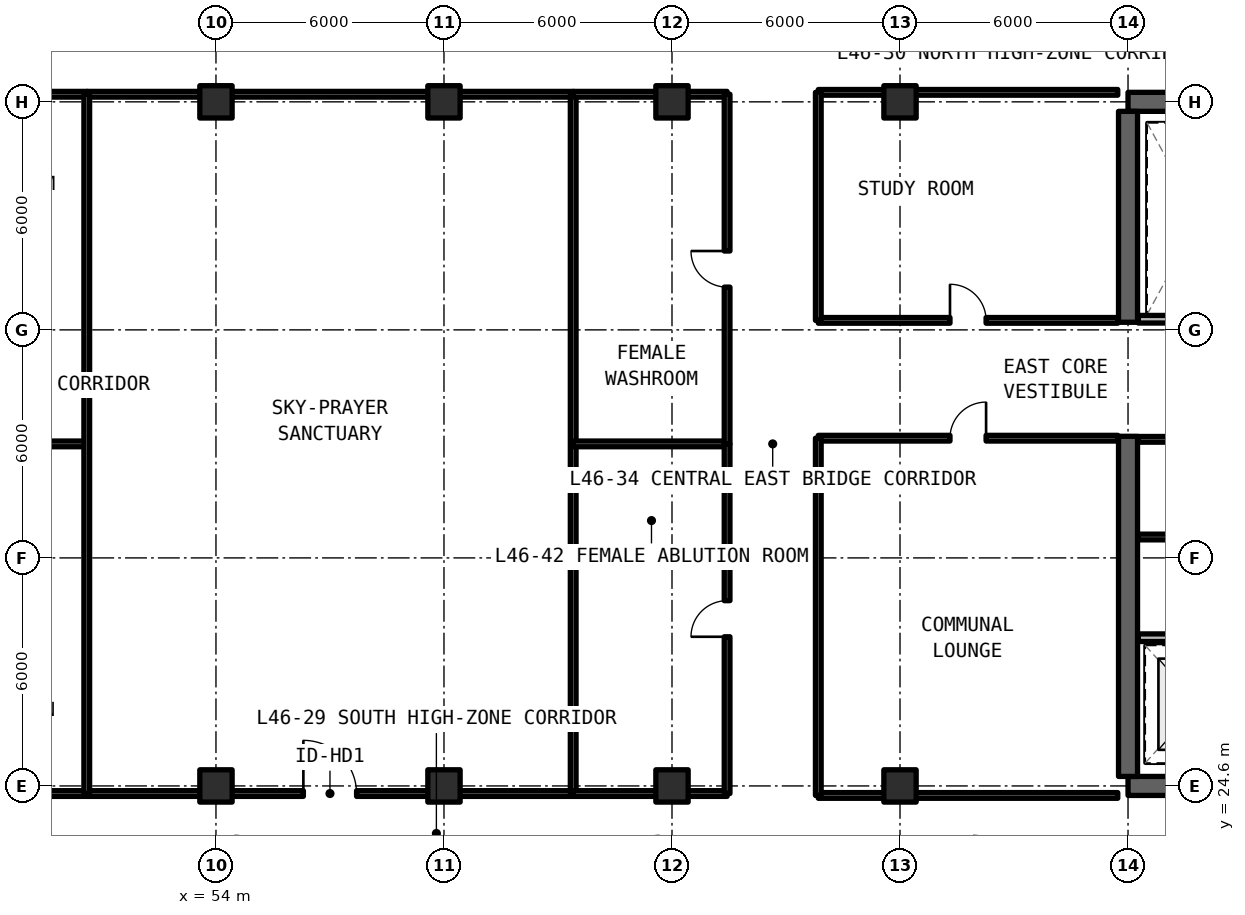
"""IFC4 building model, lengths in metres.
Left out: names, types, materials, properties, quantities, classifications, styles, units other than length and angle.
Written with IfcOpenShell. Run it as: python <this file> out.ifc"""

import sys

from ifc_helpers import new_model, si_unit, direction, frame, frame_2d, origin, origin_2d, place, context, subcontext, project, spatial, rectangle, extrude, element, fill, save


model = new_model("IFC4")
c1 = context("Model", 3, precision=1e-05, world=origin(), true_north=direction((0.0, 1.0)))
c2 = subcontext(c1, "Body", "Model", "MODEL_VIEW")
j1 = project(units=[si_unit("LENGTHUNIT", "METRE"), si_unit("PLANEANGLEUNIT", "RADIAN")], contexts=[c1])
p1 = place(None, origin())
s1 = spatial("IfcSite", under=j1, at=p1, CompositionType="ELEMENT")
p2 = place(p1, origin())
s2 = spatial("IfcBuilding", under=s1, at=p2, CompositionType="ELEMENT")
p3 = place(p2, frame((0.0, 0.0, 165.66)))
s3 = spatial("IfcBuildingStorey", under=s2, at=p3, CompositionType="ELEMENT", Elevation=165.66)
for number, where, z_axis, x_axis in (
    (1, (78.0, 24.6, 0.0), (0.0, 0.0, 1.0), (1.0, 0.0, 0.0)),
    (2, (90.0, 42.6, 0.0), (0.0, 0.0, 1.0), (-1.0, 0.0, 0.0)),
):
    element("IfcWall", number, at=place(p3, frame(where, z_axis=z_axis, x_axis=x_axis)), inside=s3, PredefinedType="SHEAR", context=c2, shape_type="SweptSolid", body=[
        extrude(rectangle(XDim=12.0, YDim=0.5, at=frame_2d((6.0, 0.0))), origin(), (0.0, 0.0, 1.0), 3.63),
    ])
p4 = place(p3, frame((78.0, 24.85, 0.0), z_axis=(0.0, 0.0, 1.0), x_axis=(0.0, 1.0, 0.0)))
e3 = element("IfcWall", 3, at=p4, inside=s3, PredefinedType="SHEAR", context=c2, shape_type="SweptSolid", body=[
    extrude(rectangle(XDim=8.95, YDim=0.5, at=frame_2d((4.475, 0.0))), origin(), (0.0, 0.0, 1.0), 3.63),
])
p5 = place(p3, frame((78.0, 36.8, 0.0), z_axis=(0.0, 0.0, 1.0), x_axis=(0.0, 1.0, 0.0)))
e4 = element("IfcWall", 4, at=p5, inside=s3, PredefinedType="SHEAR", context=c2, shape_type="SweptSolid", body=[
    extrude(rectangle(XDim=5.55, YDim=0.5, at=frame_2d((2.775, 0.0))), origin(), (0.0, 0.0, 1.0), 3.63),
])
for number, where, z_axis, x_axis in (
    (5, (54.0, 24.6, 0.0), (0.0, 0.0, 1.0), (1.0, 0.0, 0.0)),
    (6, (54.0, 42.6, 0.0), (0.0, 0.0, 1.0), (1.0, 0.0, 0.0)),
    (7, (60.0, 24.6, 0.0), (0.0, 0.0, 1.0), (1.0, 0.0, 0.0)),
    (8, (60.0, 42.6, 0.0), (0.0, 0.0, 1.0), (1.0, 0.0, 0.0)),
    (9, (66.0, 24.6, 0.0), (0.0, 0.0, 1.0), (1.0, 0.0, 0.0)),
    (10, (66.0, 42.6, 0.0), (0.0, 0.0, 1.0), (1.0, 0.0, 0.0)),
    (11, (72.0, 24.6, 0.0), (0.0, 0.0, 1.0), (1.0, 0.0, 0.0)),
    (12, (72.0, 42.6, 0.0), (0.0, 0.0, 1.0), (1.0, 0.0, 0.0)),
):
    element("IfcColumn", number, at=place(p3, frame(where, z_axis=z_axis, x_axis=x_axis)), inside=s3, PredefinedType="COLUMN", context=c2, shape_type="SweptSolid", body=[
        extrude(rectangle(XDim=0.85, YDim=0.85, at=origin_2d()), origin(), (0.0, 0.0, 1.0), 3.63),
    ])
p6 = place(p3, frame((78.27, 28.5, 0.0), z_axis=(0.0, 0.0, 1.0), x_axis=(1.0, 0.0, 0.0)))
e13 = element("IfcWall", 13, at=p6, inside=s3, PredefinedType="SOLIDWALL", context=c2, shape_type="SweptSolid", body=[
    extrude(rectangle(XDim=7.51, YDim=0.2, at=frame_2d((3.755, 0.0))), origin(), (0.0, 0.0, 1.0), 2.63),
])
p7 = place(p6, frame((3.53, 0.0, 0.0)))
e14 = element("IfcOpeningElement", 14, at=p7, cuts=e13, PredefinedType="OPENING", context=c2, shape_type="SweptSolid", body=[
    extrude(rectangle(XDim=1.0, YDim=2.15, at=frame_2d((0.5, 1.075))), frame((0.0, 0.11, 0.0), z_axis=(0.0, -1.0, 0.0), x_axis=(1.0, 0.0, 0.0)), (0.0, 0.0, 1.0), 0.22),
])
for number, where, z_axis, x_axis in (
    (15, (78.27, 31.15, 0.0), (0.0, 0.0, 1.0), (1.0, 0.0, 0.0)),
    (16, (78.27, 33.72, 0.0), (0.0, 0.0, 1.0), (1.0, 0.0, 0.0)),
):
    element("IfcWall", number, at=place(p3, frame(where, z_axis=z_axis, x_axis=x_axis)), inside=s3, PredefinedType="SOLIDWALL", context=c2, shape_type="SweptSolid", body=[
        extrude(rectangle(XDim=3.05, YDim=0.15, at=frame_2d((1.525, 0.0))), origin(), (0.0, 0.0, 1.0), 2.63),
    ])
p8 = place(p3, frame((78.27, 36.88, 0.0), z_axis=(0.0, 0.0, 1.0), x_axis=(1.0, 0.0, 0.0)))
e17 = element("IfcWall", 17, at=p8, inside=s3, PredefinedType="SOLIDWALL", context=c2, shape_type="SweptSolid", body=[
    extrude(rectangle(XDim=3.05, YDim=0.2, at=frame_2d((1.525, 0.0))), origin(), (0.0, 0.0, 1.0), 2.63),
])
p9 = place(p3, frame((69.85, 24.35, 0.0), z_axis=(0.0, 0.0, 1.0), x_axis=(1.0, 0.0, 0.0)))
e18 = element("IfcWall", 18, at=p9, inside=s3, PredefinedType="SOLIDWALL", context=c2, shape_type="SweptSolid", body=[
    extrude(rectangle(XDim=7.88, YDim=0.15, at=frame_2d((3.94, 0.0))), origin(), (0.0, 0.0, 1.0), 2.63),
])
p10 = place(p3, frame((69.85, 33.75, 0.0), z_axis=(0.0, 0.0, 1.0), x_axis=(1.0, 0.0, 0.0)))
e19 = element("IfcWall", 19, at=p10, inside=s3, PredefinedType="SOLIDWALL", context=c2, shape_type="SweptSolid", body=[
    extrude(rectangle(XDim=7.88, YDim=0.15, at=frame_2d((3.94, 0.0))), origin(), (0.0, 0.0, 1.0), 2.63),
])
p11 = place(p10, frame((3.465, 0.0, 0.0)))
e20 = element("IfcOpeningElement", 20, at=p11, cuts=e19, PredefinedType="OPENING", context=c2, shape_type="SweptSolid", body=[
    extrude(rectangle(XDim=0.95, YDim=2.15, at=frame_2d((0.475, 1.075))), frame((0.0, 0.085, 0.0), z_axis=(0.0, -1.0, 0.0), x_axis=(1.0, 0.0, 0.0)), (0.0, 0.0, 1.0), 0.17),
])
p12 = place(p3, frame((69.85, 24.35, 0.0), z_axis=(0.0, 0.0, 1.0), x_axis=(0.0, 1.0, 0.0)))
e21 = element("IfcWall", 21, at=p12, inside=s3, PredefinedType="SOLIDWALL", context=c2, shape_type="SweptSolid", body=[
    extrude(rectangle(XDim=9.4, YDim=0.15, at=frame_2d((4.7, 0.0))), origin(), (0.0, 0.0, 1.0), 2.63),
])
p13 = place(p3, frame((69.85, 36.85, 0.0), z_axis=(0.0, 0.0, 1.0), x_axis=(1.0, 0.0, 0.0)))
e22 = element("IfcWall", 22, at=p13, inside=s3, PredefinedType="SOLIDWALL", context=c2, shape_type="SweptSolid", body=[
    extrude(rectangle(XDim=7.88, YDim=0.15, at=frame_2d((3.94, 0.0))), origin(), (0.0, 0.0, 1.0), 2.63),
])
p14 = place(p13, frame((3.465, 0.0, 0.0)))
e23 = element("IfcOpeningElement", 23, at=p14, cuts=e22, PredefinedType="OPENING", context=c2, shape_type="SweptSolid", body=[
    extrude(rectangle(XDim=0.95, YDim=2.15, at=frame_2d((0.475, 1.075))), frame((0.0, 0.085, 0.0), z_axis=(0.0, -1.0, 0.0), x_axis=(1.0, 0.0, 0.0)), (0.0, 0.0, 1.0), 0.17),
])
p15 = place(p3, frame((69.85, 42.85, 0.0), z_axis=(0.0, 0.0, 1.0), x_axis=(1.0, 0.0, 0.0)))
e24 = element("IfcWall", 24, at=p15, inside=s3, PredefinedType="SOLIDWALL", context=c2, shape_type="SweptSolid", body=[
    extrude(rectangle(XDim=7.88, YDim=0.15, at=frame_2d((3.94, 0.0))), origin(), (0.0, 0.0, 1.0), 2.63),
])
p16 = place(p3, frame((69.85, 36.85, 0.0), z_axis=(0.0, 0.0, 1.0), x_axis=(0.0, 1.0, 0.0)))
e25 = element("IfcWall", 25, at=p16, inside=s3, PredefinedType="SOLIDWALL", context=c2, shape_type="SweptSolid", body=[
    extrude(rectangle(XDim=6.0, YDim=0.15, at=frame_2d((3.0, 0.0))), origin(), (0.0, 0.0, 1.0), 2.63),
])
for number, where, z_axis, x_axis in (
    (26, (46.55, 24.4, 0.0), (0.0, 0.0, 1.0), (1.0, 0.0, 0.0)),
    (27, (46.55, 33.6, 0.0), (0.0, 0.0, 1.0), (1.0, 0.0, 0.0)),
    (28, (46.55, 42.8, 0.0), (0.0, 0.0, 1.0), (1.0, 0.0, 0.0)),
):
    element("IfcWall", number, at=place(p3, frame(where, z_axis=z_axis, x_axis=x_axis)), inside=s3, PredefinedType="SOLIDWALL", context=c2, shape_type="SweptSolid", body=[
        extrude(rectangle(XDim=4.05, YDim=0.15, at=frame_2d((2.025, 0.0))), origin(), (0.0, 0.0, 1.0), 2.63),
    ])
p17 = place(p3, frame((50.6, 24.4, 0.0), z_axis=(0.0, 0.0, 1.0), x_axis=(1.0, 0.0, 0.0)))
e29 = element("IfcWall", 29, at=p17, inside=s3, PredefinedType="SOLIDWALL", context=c2, shape_type="SweptSolid", body=[
    extrude(rectangle(XDim=12.8, YDim=0.15, at=frame_2d((6.4, 0.0))), origin(), (0.0, 0.0, 1.0), 2.63),
])
p18 = place(p17, frame((5.7, 0.0, 0.0)))
e30 = element("IfcOpeningElement", 30, at=p18, cuts=e29, PredefinedType="OPENING", context=c2, shape_type="SweptSolid", body=[
    extrude(rectangle(XDim=1.4, YDim=2.15, at=frame_2d((0.7, 1.075))), frame((0.0, 0.085, 0.0), z_axis=(0.0, -1.0, 0.0), x_axis=(1.0, 0.0, 0.0)), (0.0, 0.0, 1.0), 0.17),
])
p19 = place(p3, frame((50.6, 42.8, 0.0), z_axis=(0.0, 0.0, 1.0), x_axis=(1.0, 0.0, 0.0)))
e31 = element("IfcWall", 31, at=p19, inside=s3, PredefinedType="SOLIDWALL", context=c2, shape_type="SweptSolid", body=[
    extrude(rectangle(XDim=12.8, YDim=0.15, at=frame_2d((6.4, 0.0))), origin(), (0.0, 0.0, 1.0), 2.63),
])
for number, where, z_axis, x_axis in (
    (32, (50.6, 24.4, 0.0), (0.0, 0.0, 1.0), (0.0, 1.0, 0.0)),
    (33, (63.4, 24.4, 0.0), (0.0, 0.0, 1.0), (0.0, 1.0, 0.0)),
):
    element("IfcWall", number, at=place(p3, frame(where, z_axis=z_axis, x_axis=x_axis)), inside=s3, PredefinedType="SOLIDWALL", context=c2, shape_type="SweptSolid", body=[
        extrude(rectangle(XDim=18.4, YDim=0.15, at=frame_2d((9.2, 0.0))), origin(), (0.0, 0.0, 1.0), 2.63),
    ])
for number, where, z_axis, x_axis in (
    (34, (63.4, 24.4, 0.0), (0.0, 0.0, 1.0), (1.0, 0.0, 0.0)),
    (35, (63.4, 33.6, 0.0), (0.0, 0.0, 1.0), (1.0, 0.0, 0.0)),
):
    element("IfcWall", number, at=place(p3, frame(where, z_axis=z_axis, x_axis=x_axis)), inside=s3, PredefinedType="SOLIDWALL", context=c2, shape_type="SweptSolid", body=[
        extrude(rectangle(XDim=4.05, YDim=0.15, at=frame_2d((2.025, 0.0))), origin(), (0.0, 0.0, 1.0), 2.63),
    ])
p20 = place(p3, frame((67.45, 24.4, 0.0), z_axis=(0.0, 0.0, 1.0), x_axis=(0.0, 1.0, 0.0)))
e36 = element("IfcWall", 36, at=p20, inside=s3, PredefinedType="SOLIDWALL", context=c2, shape_type="SweptSolid", body=[
    extrude(rectangle(XDim=9.2, YDim=0.15, at=frame_2d((4.6, 0.0))), origin(), (0.0, 0.0, 1.0), 2.63),
])
p21 = place(p20, frame((4.125, 0.0, 0.0)))
e37 = element("IfcOpeningElement", 37, at=p21, cuts=e36, PredefinedType="OPENING", context=c2, shape_type="SweptSolid", body=[
    extrude(rectangle(XDim=0.95, YDim=2.15, at=frame_2d((0.475, 1.075))), frame((0.0, 0.085, 0.0), z_axis=(0.0, -1.0, 0.0), x_axis=(1.0, 0.0, 0.0)), (0.0, 0.0, 1.0), 0.17),
])
p22 = place(p3, frame((63.4, 42.8, 0.0), z_axis=(0.0, 0.0, 1.0), x_axis=(1.0, 0.0, 0.0)))
e38 = element("IfcWall", 38, at=p22, inside=s3, PredefinedType="SOLIDWALL", context=c2, shape_type="SweptSolid", body=[
    extrude(rectangle(XDim=4.05, YDim=0.15, at=frame_2d((2.025, 0.0))), origin(), (0.0, 0.0, 1.0), 2.63),
])
p23 = place(p3, frame((67.45, 33.6, 0.0), z_axis=(0.0, 0.0, 1.0), x_axis=(0.0, 1.0, 0.0)))
e39 = element("IfcWall", 39, at=p23, inside=s3, PredefinedType="SOLIDWALL", context=c2, shape_type="SweptSolid", body=[
    extrude(rectangle(XDim=9.2, YDim=0.15, at=frame_2d((4.6, 0.0))), origin(), (0.0, 0.0, 1.0), 2.63),
])
p24 = place(p23, frame((4.125, 0.0, 0.0)))
e40 = element("IfcOpeningElement", 40, at=p24, cuts=e39, PredefinedType="OPENING", context=c2, shape_type="SweptSolid", body=[
    extrude(rectangle(XDim=0.95, YDim=2.15, at=frame_2d((0.475, 1.075))), frame((0.0, 0.085, 0.0), z_axis=(0.0, -1.0, 0.0), x_axis=(1.0, 0.0, 0.0)), (0.0, 0.0, 1.0), 0.17),
])
p25 = place(p11, origin())
e41 = element("IfcDoor", 41, at=p25, inside=s3, OperationType="SINGLE_SWING_RIGHT", PredefinedType="DOOR", context=c2, shape_type="SweptSolid", body=[
    extrude(rectangle(XDim=0.95, YDim=2.15, at=frame_2d((0.475, 1.075))), frame((0.0, 0.025, 0.0), z_axis=(0.0, -1.0, 0.0), x_axis=(1.0, 0.0, 0.0)), (0.0, 0.0, 1.0), 0.05),
])
fill(e20, e41)
p26 = place(p14, origin())
e42 = element("IfcDoor", 42, at=p26, inside=s3, OperationType="SINGLE_SWING_LEFT", PredefinedType="DOOR", context=c2, shape_type="SweptSolid", body=[
    extrude(rectangle(XDim=0.95, YDim=2.15, at=frame_2d((0.475, 1.075))), frame((0.0, 0.025, 0.0), z_axis=(0.0, -1.0, 0.0), x_axis=(1.0, 0.0, 0.0)), (0.0, 0.0, 1.0), 0.05),
])
fill(e23, e42)
p27 = place(p18, origin())
e43 = element("IfcDoor", 43, at=p27, inside=s3, OperationType="SINGLE_SWING_RIGHT", PredefinedType="DOOR", context=c2, shape_type="SweptSolid", body=[
    extrude(rectangle(XDim=1.4, YDim=2.15, at=frame_2d((0.7, 1.075))), frame((0.0, 0.025, 0.0), z_axis=(0.0, -1.0, 0.0), x_axis=(1.0, 0.0, 0.0)), (0.0, 0.0, 1.0), 0.05),
])
fill(e30, e43)
p28 = place(p21, origin())
e44 = element("IfcDoor", 44, at=p28, inside=s3, OperationType="SINGLE_SWING_LEFT", PredefinedType="DOOR", context=c2, shape_type="SweptSolid", body=[
    extrude(rectangle(XDim=0.95, YDim=2.15, at=frame_2d((0.475, 1.075))), frame((0.0, 0.025, 0.0), z_axis=(0.0, -1.0, 0.0), x_axis=(1.0, 0.0, 0.0)), (0.0, 0.0, 1.0), 0.05),
])
fill(e37, e44)
p29 = place(p24, origin())
e45 = element("IfcDoor", 45, at=p29, inside=s3, OperationType="SINGLE_SWING_RIGHT", PredefinedType="DOOR", context=c2, shape_type="SweptSolid", body=[
    extrude(rectangle(XDim=0.95, YDim=2.15, at=frame_2d((0.475, 1.075))), frame((0.0, 0.025, 0.0), z_axis=(0.0, -1.0, 0.0), x_axis=(1.0, 0.0, 0.0)), (0.0, 0.0, 1.0), 0.05),
])
fill(e40, e45)
save(model, sys.argv[1])
